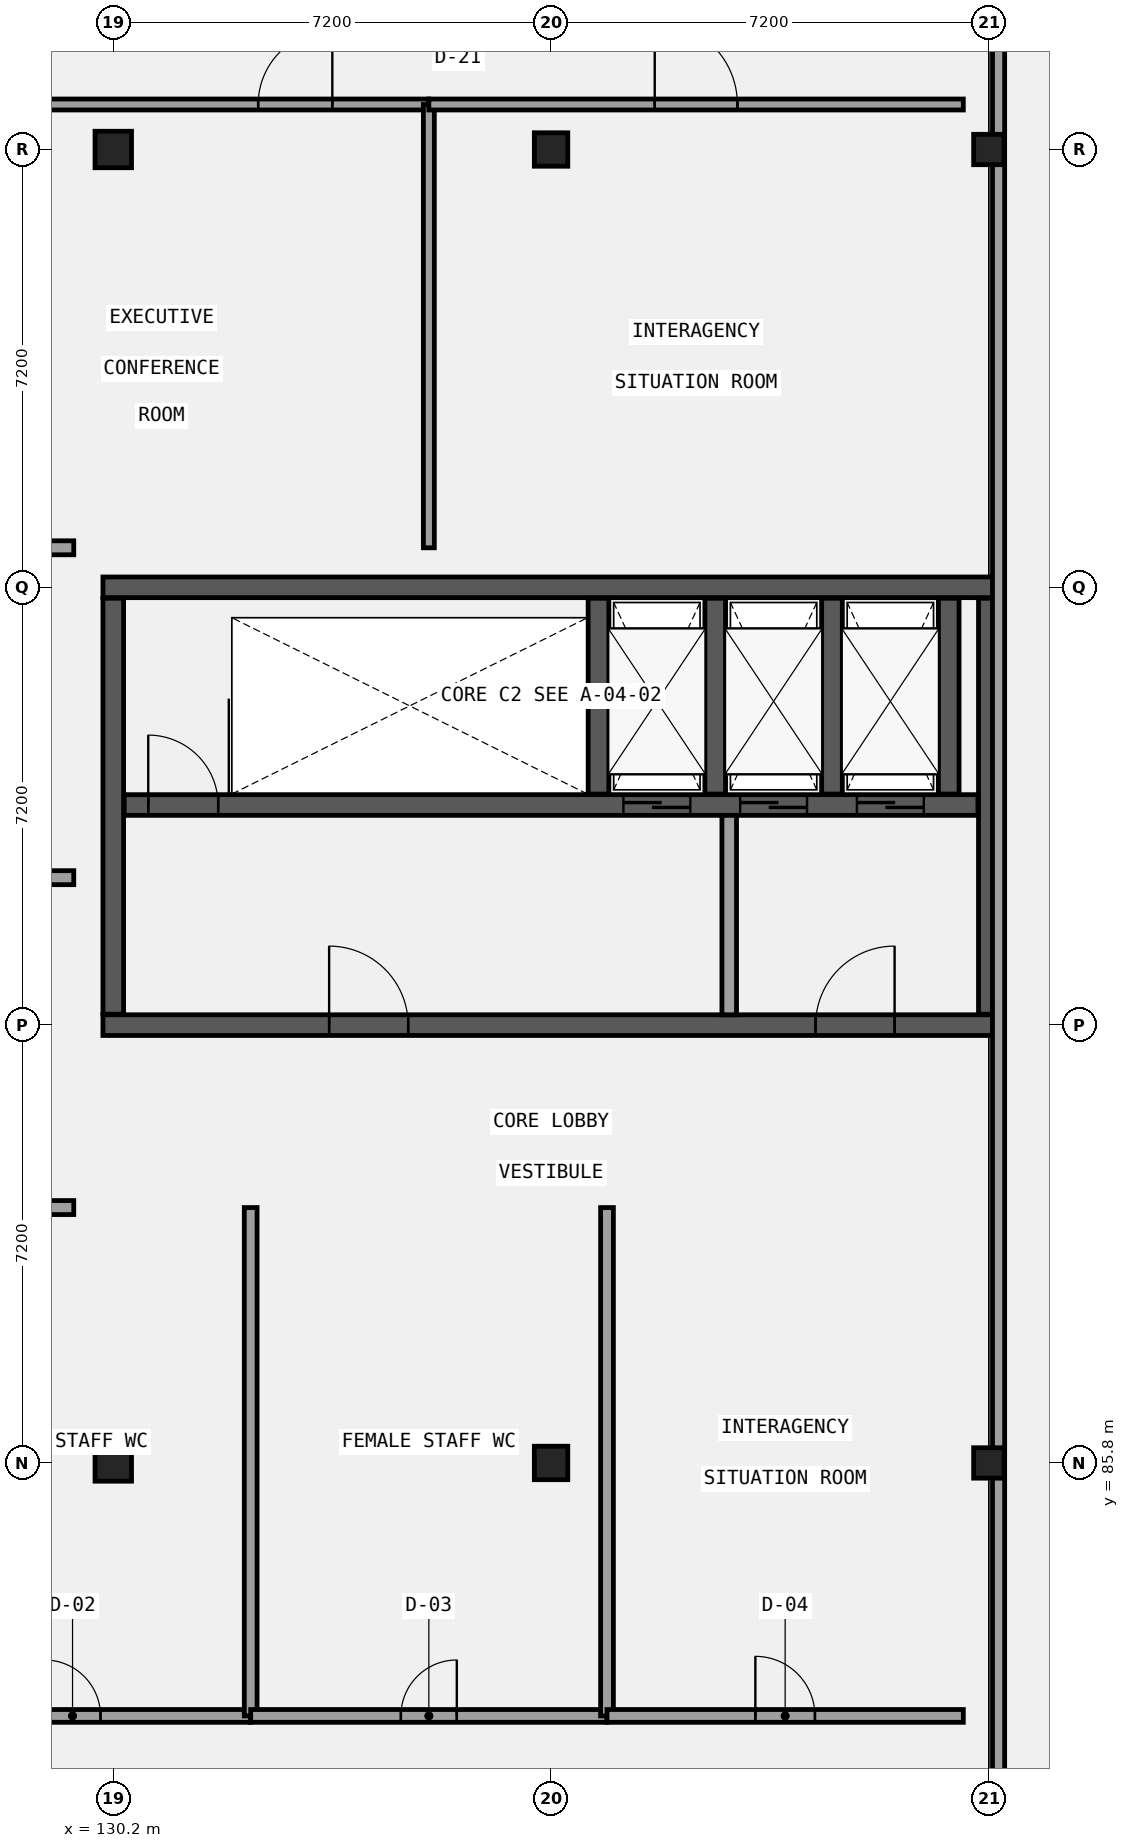
"""IFC4 building model, lengths in metres.
Left out: names, types, materials, properties, quantities, classifications, styles, units other than length and angle.
Written with IfcOpenShell. Run it as: python <this file> out.ifc"""

import sys

from ifc_helpers import new_model, si_unit, direction, frame, frame_2d, origin, origin_2d, place, context, subcontext, project, spatial, rectangle, extrude, element, fill, save


model = new_model("IFC4")
c1 = context("Model", 3, precision=1e-05, world=origin(), true_north=direction((0.0, 1.0)))
c2 = subcontext(c1, "Body", "Model", "MODEL_VIEW")
j1 = project(units=[si_unit("LENGTHUNIT", "METRE"), si_unit("PLANEANGLEUNIT", "RADIAN")], contexts=[c1])
p1 = place(None, origin())
s1 = spatial("IfcSite", under=j1, at=p1, CompositionType="ELEMENT")
p2 = place(p1, origin())
s2 = spatial("IfcBuilding", under=s1, at=p2, CompositionType="ELEMENT")
p3 = place(p2, frame((0.0, 0.0, 30.9)))
s3 = spatial("IfcBuildingStorey", under=s2, at=p3, CompositionType="ELEMENT", Elevation=30.9)
p4 = place(p3, frame((130.03, 100.2, 0.0), z_axis=(0.0, 0.0, 1.0), x_axis=(1.0, 0.0, 0.0)))
e1 = element("IfcWall", 1, at=p4, inside=s3, PredefinedType="SHEAR", context=c2, shape_type="SweptSolid", body=[
    extrude(rectangle(XDim=14.74, YDim=0.34, at=frame_2d((7.37, 0.0))), origin(), (0.0, 0.0, 1.0), 4.5),
])
p5 = place(p3, frame((130.03, 93.0, 0.0), z_axis=(0.0, 0.0, 1.0), x_axis=(1.0, 0.0, 0.0)))
e2 = element("IfcWall", 2, at=p5, inside=s3, PredefinedType="SHEAR", context=c2, shape_type="SweptSolid", body=[
    extrude(rectangle(XDim=14.74, YDim=0.34, at=frame_2d((7.37, 0.0))), origin(), (0.0, 0.0, 1.0), 4.5),
])
p6 = place(p5, frame((3.72, 0.0, 0.0)))
e3 = element("IfcOpeningElement", 3, at=p6, cuts=e2, PredefinedType="OPENING", context=c2, shape_type="SweptSolid", body=[
    extrude(rectangle(XDim=1.3, YDim=2.2, at=frame_2d((0.65, 1.1))), frame((0.0, 0.18, 0.0), z_axis=(0.0, -1.0, 0.0), x_axis=(1.0, 0.0, 0.0)), (0.0, 0.0, 1.0), 0.36),
])
p7 = place(p5, frame((11.72, 0.0, 0.0)))
e4 = element("IfcOpeningElement", 4, at=p7, cuts=e2, PredefinedType="OPENING", context=c2, shape_type="SweptSolid", body=[
    extrude(rectangle(XDim=1.3, YDim=2.2, at=frame_2d((0.65, 1.1))), frame((0.0, 0.18, 0.0), z_axis=(0.0, -1.0, 0.0), x_axis=(1.0, 0.0, 0.0)), (0.0, 0.0, 1.0), 0.36),
])
for number, where, z_axis, x_axis in (
    (5, (130.2, 93.18, 0.0), (0.0, 0.0, 1.0), (0.0, 1.0, 0.0)),
    (6, (144.6, 93.18, 0.0), (0.0, 0.0, 1.0), (0.0, 1.0, 0.0)),
):
    element("IfcWall", number, at=place(p3, frame(where, z_axis=z_axis, x_axis=x_axis)), inside=s3, PredefinedType="SHEAR", context=c2, shape_type="SweptSolid", body=[
        extrude(rectangle(XDim=6.84, YDim=0.34, at=frame_2d((3.42, 0.0))), origin(), (0.0, 0.0, 1.0), 4.5),
    ])
p8 = place(p3, frame((130.38, 96.62, 0.0), z_axis=(0.0, 0.0, 1.0), x_axis=(1.0, 0.0, 0.0)))
e7 = element("IfcWall", 7, at=p8, inside=s3, PredefinedType="SHEAR", context=c2, shape_type="SweptSolid", body=[
    extrude(rectangle(XDim=14.04, YDim=0.34, at=frame_2d((7.02, 0.0))), origin(), (0.0, 0.0, 1.0), 4.5),
])
p9 = place(p8, frame((8.21, 0.0, 0.0)))
e8 = element("IfcOpeningElement", 8, at=p9, cuts=e7, PredefinedType="OPENING", context=c2, shape_type="SweptSolid", body=[
    extrude(rectangle(XDim=1.1, YDim=2.15, at=frame_2d((0.55, 1.075))), frame((0.0, 0.18, 0.0), z_axis=(0.0, -1.0, 0.0), x_axis=(1.0, 0.0, 0.0)), (0.0, 0.0, 1.0), 0.36),
])
p10 = place(p8, frame((10.13, 0.0, 0.0)))
e9 = element("IfcOpeningElement", 9, at=p10, cuts=e7, PredefinedType="OPENING", context=c2, shape_type="SweptSolid", body=[
    extrude(rectangle(XDim=1.1, YDim=2.15, at=frame_2d((0.55, 1.075))), frame((0.0, 0.18, 0.0), z_axis=(0.0, -1.0, 0.0), x_axis=(1.0, 0.0, 0.0)), (0.0, 0.0, 1.0), 0.36),
])
p11 = place(p8, frame((12.05, 0.0, 0.0)))
e10 = element("IfcOpeningElement", 10, at=p11, cuts=e7, PredefinedType="OPENING", context=c2, shape_type="SweptSolid", body=[
    extrude(rectangle(XDim=1.1, YDim=2.15, at=frame_2d((0.55, 1.075))), frame((0.0, 0.18, 0.0), z_axis=(0.0, -1.0, 0.0), x_axis=(1.0, 0.0, 0.0)), (0.0, 0.0, 1.0), 0.36),
])
p12 = place(p8, frame((0.395, 0.0, 0.0)))
e11 = element("IfcOpeningElement", 11, at=p12, cuts=e7, PredefinedType="OPENING", context=c2, shape_type="SweptSolid", body=[
    extrude(rectangle(XDim=1.15, YDim=2.15, at=frame_2d((0.575, 1.075))), frame((0.0, 0.18, 0.0), z_axis=(0.0, -1.0, 0.0), x_axis=(1.0, 0.0, 0.0)), (0.0, 0.0, 1.0), 0.36),
])
for number, where, z_axis, x_axis in (
    (12, (138.18, 96.8, 0.0), (0.0, 0.0, 1.0), (0.0, 1.0, 0.0)),
    (13, (140.1, 96.8, 0.0), (0.0, 0.0, 1.0), (0.0, 1.0, 0.0)),
    (14, (142.02, 96.8, 0.0), (0.0, 0.0, 1.0), (0.0, 1.0, 0.0)),
    (15, (143.94, 96.8, 0.0), (0.0, 0.0, 1.0), (0.0, 1.0, 0.0)),
):
    element("IfcWall", number, at=place(p3, frame(where, z_axis=z_axis, x_axis=x_axis)), inside=s3, PredefinedType="SHEAR", context=c2, shape_type="SweptSolid", body=[
        extrude(rectangle(XDim=3.22, YDim=0.34, at=frame_2d((1.61, 0.0))), origin(), (0.0, 0.0, 1.0), 4.5),
    ])
for number, where, z_axis, x_axis in (
    (16, (130.2, 85.8, 0.0), (0.0, 0.0, 1.0), (1.0, 0.0, 0.0)),
    (17, (130.2, 107.4, 0.0), (0.0, 0.0, 1.0), (1.0, 0.0, 0.0)),
):
    element("IfcColumn", number, at=place(p3, frame(where, z_axis=z_axis, x_axis=x_axis)), inside=s3, PredefinedType="COLUMN", context=c2, shape_type="SweptSolid", body=[
        extrude(rectangle(XDim=0.6, YDim=0.6, at=origin_2d()), origin(), (0.0, 0.0, 1.0), 4.5),
    ])
for number, where, z_axis, x_axis in (
    (18, (137.4, 85.8, 0.0), (0.0, 0.0, 1.0), (1.0, 0.0, 0.0)),
    (19, (137.4, 107.4, 0.0), (0.0, 0.0, 1.0), (1.0, 0.0, 0.0)),
):
    element("IfcColumn", number, at=place(p3, frame(where, z_axis=z_axis, x_axis=x_axis)), inside=s3, PredefinedType="COLUMN", context=c2, shape_type="SweptSolid", body=[
        extrude(rectangle(XDim=0.55, YDim=0.55, at=origin_2d()), origin(), (0.0, 0.0, 1.0), 4.5),
    ])
for number, where, z_axis, x_axis in (
    (20, (144.6, 85.8, 0.0), (0.0, 0.0, 1.0), (1.0, 0.0, 0.0)),
    (21, (144.6, 107.4, 0.0), (0.0, 0.0, 1.0), (1.0, 0.0, 0.0)),
):
    element("IfcColumn", number, at=place(p3, frame(where, z_axis=z_axis, x_axis=x_axis)), inside=s3, PredefinedType="COLUMN", context=c2, shape_type="SweptSolid", body=[
        extrude(rectangle(XDim=0.5, YDim=0.5, at=origin_2d()), origin(), (0.0, 0.0, 1.0), 4.5),
    ])
p13 = place(p3, frame((140.33, 93.17, 0.0), z_axis=(0.0, 0.0, 1.0), x_axis=(0.0, 1.0, 0.0)))
e22 = element("IfcWall", 22, at=p13, inside=s3, PredefinedType="SOLIDWALL", context=c2, shape_type="SweptSolid", body=[
    extrude(rectangle(XDim=3.28, YDim=0.24, at=frame_2d((1.64, 0.0))), origin(), (0.0, 0.0, 1.0), 4.22),
])
p14 = place(p3, frame((144.76, 79.31, 4.5), z_axis=(0.0, 0.0, 1.0), x_axis=(0.0, 1.0, 0.0)))
e23 = element("IfcWall", 23, at=p14, inside=s3, PredefinedType="PARAPET", context=c2, shape_type="SweptSolid", body=[
    extrude(rectangle(XDim=33.98, YDim=0.2, at=frame_2d((16.99, 0.0))), origin(), (0.0, 0.0, 1.0), 1.12),
])
p15 = place(p3, frame((126.6, 108.14, 0.0), z_axis=(0.0, 0.0, 1.0), x_axis=(1.0, 0.0, 0.0)))
e24 = element("IfcWall", 24, at=p15, inside=s3, PredefinedType="PARTITIONING", context=c2, shape_type="SweptSolid", body=[
    extrude(rectangle(XDim=8.79, YDim=0.18, at=frame_2d((4.395, 0.0))), origin(), (0.0, 0.0, 1.0), 4.25),
])
p16 = place(p15, frame((5.982, 0.0, 0.0)))
e25 = element("IfcOpeningElement", 25, at=p16, cuts=e24, PredefinedType="OPENING", context=c2, shape_type="SweptSolid", body=[
    extrude(rectangle(XDim=1.22, YDim=2.35, at=frame_2d((0.61, 1.175))), frame((0.0, 0.1, 0.0), z_axis=(0.0, -1.0, 0.0), x_axis=(1.0, 0.0, 0.0)), (0.0, 0.0, 1.0), 0.2),
])
p17 = place(p3, frame((135.39, 100.85, 0.0), z_axis=(0.0, 0.0, 1.0), x_axis=(0.0, 1.0, 0.0)))
e26 = element("IfcWall", 26, at=p17, inside=s3, PredefinedType="PARTITIONING", context=c2, shape_type="SweptSolid", body=[
    extrude(rectangle(XDim=7.29, YDim=0.18, at=frame_2d((3.645, 0.0))), origin(), (0.0, 0.0, 1.0), 4.25),
])
p18 = place(p3, frame((135.39, 108.14, 0.0), z_axis=(0.0, 0.0, 1.0), x_axis=(1.0, 0.0, 0.0)))
e27 = element("IfcWall", 27, at=p18, inside=s3, PredefinedType="PARTITIONING", context=c2, shape_type="SweptSolid", body=[
    extrude(rectangle(XDim=8.79, YDim=0.18, at=frame_2d((4.395, 0.0))), origin(), (0.0, 0.0, 1.0), 4.25),
])
p19 = place(p18, frame((3.715, 0.0, 0.0)))
e28 = element("IfcOpeningElement", 28, at=p19, cuts=e27, PredefinedType="OPENING", context=c2, shape_type="SweptSolid", body=[
    extrude(rectangle(XDim=1.36, YDim=2.1, at=frame_2d((0.68, 1.05))), frame((0.0, 0.1, 0.0), z_axis=(0.0, -1.0, 0.0), x_axis=(1.0, 0.0, 0.0)), (0.0, 0.0, 1.0), 0.2),
])
p20 = place(p3, frame((126.6, 81.64, 0.0), z_axis=(0.0, 0.0, 1.0), x_axis=(1.0, 0.0, 0.0)))
e29 = element("IfcWall", 29, at=p20, inside=s3, PredefinedType="PARTITIONING", context=c2, shape_type="SweptSolid", body=[
    extrude(rectangle(XDim=5.86, YDim=0.21, at=frame_2d((2.93, 0.0))), origin(), (0.0, 0.0, 1.0), 4.25),
])
p21 = place(p20, frame((2.47, 0.0, 0.0)))
e30 = element("IfcOpeningElement", 30, at=p21, cuts=e29, PredefinedType="OPENING", context=c2, shape_type="SweptSolid", body=[
    extrude(rectangle(XDim=0.92, YDim=2.22, at=frame_2d((0.46, 1.11))), frame((0.0, 0.115, 0.0), z_axis=(0.0, -1.0, 0.0), x_axis=(1.0, 0.0, 0.0)), (0.0, 0.0, 1.0), 0.23),
])
p22 = place(p3, frame((132.46, 81.64, 0.0), z_axis=(0.0, 0.0, 1.0), x_axis=(0.0, 1.0, 0.0)))
e31 = element("IfcWall", 31, at=p22, inside=s3, PredefinedType="PARTITIONING", context=c2, shape_type="SweptSolid", body=[
    extrude(rectangle(XDim=8.36, YDim=0.21, at=frame_2d((4.18, 0.0))), origin(), (0.0, 0.0, 1.0), 4.25),
])
p23 = place(p3, frame((132.46, 81.64, 0.0), z_axis=(0.0, 0.0, 1.0), x_axis=(1.0, 0.0, 0.0)))
e32 = element("IfcWall", 32, at=p23, inside=s3, PredefinedType="PARTITIONING", context=c2, shape_type="SweptSolid", body=[
    extrude(rectangle(XDim=5.86, YDim=0.21, at=frame_2d((2.93, 0.0))), origin(), (0.0, 0.0, 1.0), 4.25),
])
p24 = place(p23, frame((2.47, 0.0, 0.0)))
e33 = element("IfcOpeningElement", 33, at=p24, cuts=e32, PredefinedType="OPENING", context=c2, shape_type="SweptSolid", body=[
    extrude(rectangle(XDim=0.92, YDim=2.35, at=frame_2d((0.46, 1.175))), frame((0.0, 0.115, 0.0), z_axis=(0.0, -1.0, 0.0), x_axis=(1.0, 0.0, 0.0)), (0.0, 0.0, 1.0), 0.23),
])
p25 = place(p3, frame((138.32, 81.64, 0.0), z_axis=(0.0, 0.0, 1.0), x_axis=(0.0, 1.0, 0.0)))
e34 = element("IfcWall", 34, at=p25, inside=s3, PredefinedType="PARTITIONING", context=c2, shape_type="SweptSolid", body=[
    extrude(rectangle(XDim=8.36, YDim=0.21, at=frame_2d((4.18, 0.0))), origin(), (0.0, 0.0, 1.0), 4.25),
])
p26 = place(p3, frame((138.32, 81.64, 0.0), z_axis=(0.0, 0.0, 1.0), x_axis=(1.0, 0.0, 0.0)))
e35 = element("IfcWall", 35, at=p26, inside=s3, PredefinedType="PARTITIONING", context=c2, shape_type="SweptSolid", body=[
    extrude(rectangle(XDim=5.86, YDim=0.21, at=frame_2d((2.93, 0.0))), origin(), (0.0, 0.0, 1.0), 4.25),
])
p27 = place(p26, frame((2.44, 0.0, 0.0)))
e36 = element("IfcOpeningElement", 36, at=p27, cuts=e35, PredefinedType="OPENING", context=c2, shape_type="SweptSolid", body=[
    extrude(rectangle(XDim=0.98, YDim=2.1, at=frame_2d((0.49, 1.05))), frame((0.0, 0.115, 0.0), z_axis=(0.0, -1.0, 0.0), x_axis=(1.0, 0.0, 0.0)), (0.0, 0.0, 1.0), 0.23),
])
for number, where, z_axis, x_axis in (
    (37, (126.27, 90.0, 0.0), (0.0, 0.0, 1.0), (1.0, 0.0, 0.0)),
    (38, (126.27, 100.85, 0.0), (0.0, 0.0, 1.0), (1.0, 0.0, 0.0)),
    (39, (126.27, 95.425, 0.0), (0.0, 0.0, 1.0), (1.0, 0.0, 0.0)),
):
    element("IfcWall", number, at=place(p3, frame(where, z_axis=z_axis, x_axis=x_axis)), inside=s3, PredefinedType="PARTITIONING", context=c2, shape_type="SweptSolid", body=[
        extrude(rectangle(XDim=3.28, YDim=0.23, at=frame_2d((1.64, 0.0))), origin(), (0.0, 0.0, 1.0), 4.25),
    ])
p28 = place(p9, frame((1.1, 0.0, 0.0), z_axis=(0.0, 0.0, 1.0), x_axis=(-1.0, 0.0, 0.0)))
e40 = element("IfcDoor", 40, at=p28, inside=s3, OperationType="DOUBLE_DOOR_SLIDING", PredefinedType="DOOR", context=c2, shape_type="SweptSolid", body=[
    extrude(rectangle(XDim=1.1, YDim=2.15, at=frame_2d((0.55, 1.075))), frame((0.0, 0.025, 0.0), z_axis=(0.0, -1.0, 0.0), x_axis=(1.0, 0.0, 0.0)), (0.0, 0.0, 1.0), 0.05),
])
fill(e8, e40)
p29 = place(p10, frame((1.1, 0.0, 0.0), z_axis=(0.0, 0.0, 1.0), x_axis=(-1.0, 0.0, 0.0)))
e41 = element("IfcDoor", 41, at=p29, inside=s3, OperationType="DOUBLE_DOOR_SLIDING", PredefinedType="DOOR", context=c2, shape_type="SweptSolid", body=[
    extrude(rectangle(XDim=1.1, YDim=2.15, at=frame_2d((0.55, 1.075))), frame((0.0, 0.025, 0.0), z_axis=(0.0, -1.0, 0.0), x_axis=(1.0, 0.0, 0.0)), (0.0, 0.0, 1.0), 0.05),
])
fill(e9, e41)
p30 = place(p11, frame((1.1, 0.0, 0.0), z_axis=(0.0, 0.0, 1.0), x_axis=(-1.0, 0.0, 0.0)))
e42 = element("IfcDoor", 42, at=p30, inside=s3, OperationType="DOUBLE_DOOR_SLIDING", PredefinedType="DOOR", context=c2, shape_type="SweptSolid", body=[
    extrude(rectangle(XDim=1.1, YDim=2.15, at=frame_2d((0.55, 1.075))), frame((0.0, 0.025, 0.0), z_axis=(0.0, -1.0, 0.0), x_axis=(1.0, 0.0, 0.0)), (0.0, 0.0, 1.0), 0.05),
])
fill(e10, e42)
p31 = place(p12, origin())
e43 = element("IfcDoor", 43, at=p31, inside=s3, OperationType="SINGLE_SWING_LEFT", PredefinedType="DOOR", context=c2, shape_type="SweptSolid", body=[
    extrude(rectangle(XDim=1.15, YDim=2.15, at=frame_2d((0.575, 1.075))), frame((0.0, 0.025, 0.0), z_axis=(0.0, -1.0, 0.0), x_axis=(1.0, 0.0, 0.0)), (0.0, 0.0, 1.0), 0.05),
])
fill(e11, e43)
p32 = place(p6, frame((1.3, 0.0, 0.0), z_axis=(0.0, 0.0, 1.0), x_axis=(-1.0, 0.0, 0.0)))
e44 = element("IfcDoor", 44, at=p32, inside=s3, OperationType="SINGLE_SWING_LEFT", PredefinedType="DOOR", context=c2, shape_type="SweptSolid", body=[
    extrude(rectangle(XDim=1.3, YDim=2.2, at=frame_2d((0.65, 1.1))), frame((0.0, 0.025, 0.0), z_axis=(0.0, -1.0, 0.0), x_axis=(1.0, 0.0, 0.0)), (0.0, 0.0, 1.0), 0.05),
])
fill(e3, e44)
p33 = place(p7, frame((1.3, 0.0, 0.0), z_axis=(0.0, 0.0, 1.0), x_axis=(-1.0, 0.0, 0.0)))
e45 = element("IfcDoor", 45, at=p33, inside=s3, OperationType="SINGLE_SWING_RIGHT", PredefinedType="DOOR", context=c2, shape_type="SweptSolid", body=[
    extrude(rectangle(XDim=1.3, YDim=2.2, at=frame_2d((0.65, 1.1))), frame((0.0, 0.025, 0.0), z_axis=(0.0, -1.0, 0.0), x_axis=(1.0, 0.0, 0.0)), (0.0, 0.0, 1.0), 0.05),
])
fill(e4, e45)
p34 = place(p16, frame((1.22, 0.0, 0.0), z_axis=(0.0, 0.0, 1.0), x_axis=(-1.0, 0.0, 0.0)))
e46 = element("IfcDoor", 46, at=p34, inside=s3, OperationType="SINGLE_SWING_RIGHT", PredefinedType="DOOR", context=c2, shape_type="SweptSolid", body=[
    extrude(rectangle(XDim=1.22, YDim=2.35, at=frame_2d((0.61, 1.175))), frame((0.0, 0.025, 0.0), z_axis=(0.0, -1.0, 0.0), x_axis=(1.0, 0.0, 0.0)), (0.0, 0.0, 1.0), 0.05),
])
fill(e25, e46)
p35 = place(p19, frame((1.36, 0.0, 0.0), z_axis=(0.0, 0.0, 1.0), x_axis=(-1.0, 0.0, 0.0)))
e47 = element("IfcDoor", 47, at=p35, inside=s3, OperationType="SINGLE_SWING_LEFT", PredefinedType="DOOR", context=c2, shape_type="SweptSolid", body=[
    extrude(rectangle(XDim=1.36, YDim=2.1, at=frame_2d((0.68, 1.05))), frame((0.0, 0.025, 0.0), z_axis=(0.0, -1.0, 0.0), x_axis=(1.0, 0.0, 0.0)), (0.0, 0.0, 1.0), 0.05),
])
fill(e28, e47)
p36 = place(p21, origin())
e48 = element("IfcDoor", 48, at=p36, inside=s3, OperationType="SINGLE_SWING_LEFT", PredefinedType="DOOR", context=c2, shape_type="SweptSolid", body=[
    extrude(rectangle(XDim=0.92, YDim=2.22, at=frame_2d((0.46, 1.11))), frame((0.0, 0.025, 0.0), z_axis=(0.0, -1.0, 0.0), x_axis=(1.0, 0.0, 0.0)), (0.0, 0.0, 1.0), 0.05),
])
fill(e30, e48)
p37 = place(p24, origin())
e49 = element("IfcDoor", 49, at=p37, inside=s3, OperationType="SINGLE_SWING_RIGHT", PredefinedType="DOOR", context=c2, shape_type="SweptSolid", body=[
    extrude(rectangle(XDim=0.92, YDim=2.35, at=frame_2d((0.46, 1.175))), frame((0.0, 0.025, 0.0), z_axis=(0.0, -1.0, 0.0), x_axis=(1.0, 0.0, 0.0)), (0.0, 0.0, 1.0), 0.05),
])
fill(e33, e49)
p38 = place(p27, origin())
e50 = element("IfcDoor", 50, at=p38, inside=s3, OperationType="SINGLE_SWING_LEFT", PredefinedType="DOOR", context=c2, shape_type="SweptSolid", body=[
    extrude(rectangle(XDim=0.98, YDim=2.1, at=frame_2d((0.49, 1.05))), frame((0.0, 0.025, 0.0), z_axis=(0.0, -1.0, 0.0), x_axis=(1.0, 0.0, 0.0)), (0.0, 0.0, 1.0), 0.05),
])
fill(e36, e50)
save(model, sys.argv[1])
